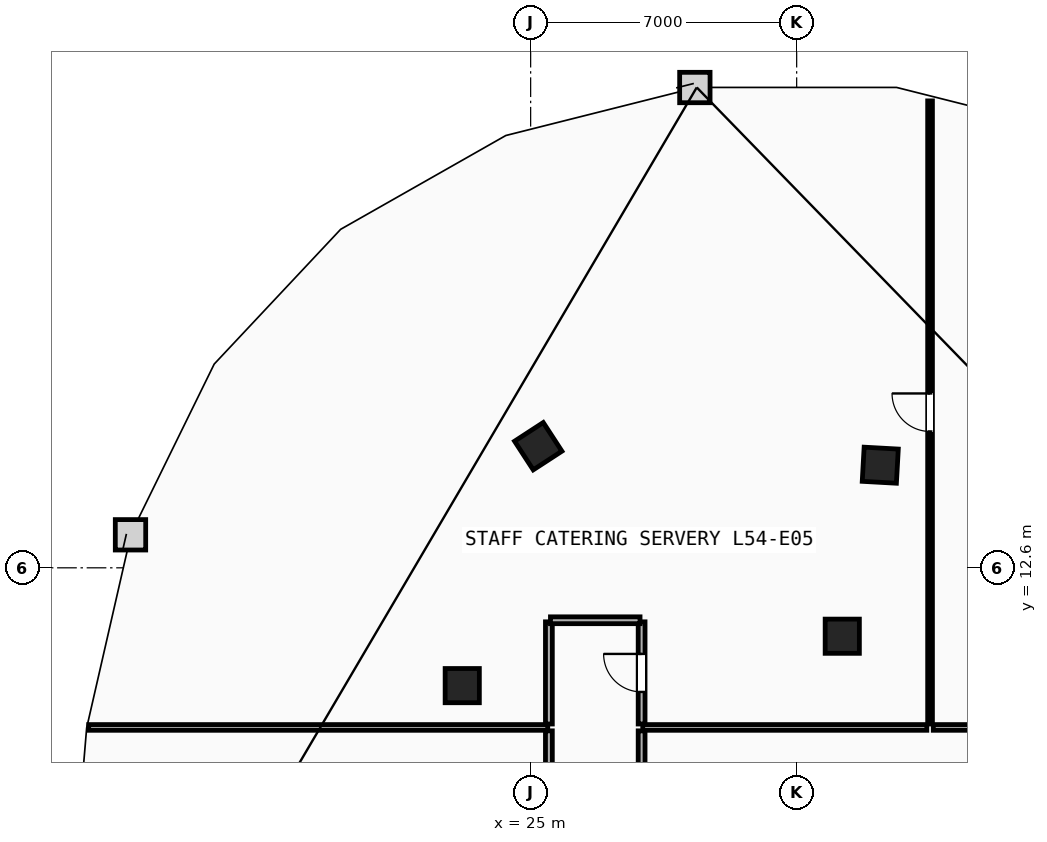
"""IFC4 building model, lengths in metres.
Left out: names, types, materials, properties, quantities, classifications, styles, units other than length and angle.
Written with IfcOpenShell. Run it as: python <this file> out.ifc"""

import sys

from ifc_helpers import new_model, si_unit, direction, frame, frame_2d, origin, origin_2d, place, context, subcontext, project, spatial, rectangle, extrude, element, fill, save


model = new_model("IFC4")
c1 = context("Model", 3, precision=1e-05, world=origin(), true_north=direction((0.0, 1.0)))
c2 = subcontext(c1, "Body", "Model", "MODEL_VIEW")
j1 = project(units=[si_unit("LENGTHUNIT", "METRE"), si_unit("PLANEANGLEUNIT", "RADIAN")], contexts=[c1])
p1 = place(None, origin())
s1 = spatial("IfcSite", under=j1, at=p1, CompositionType="ELEMENT")
p2 = place(p1, origin())
s2 = spatial("IfcBuilding", under=s1, at=p2, CompositionType="ELEMENT")
p3 = place(p2, frame((0.0, 0.0, 206.2)))
s3 = spatial("IfcBuildingStorey", under=s2, at=p3, CompositionType="ELEMENT", Elevation=206.2)
for number, where, z_axis, x_axis in (
    (1, (33.2, 10.8, 0.0), (0.0, 0.0, 1.0), (1.0, 0.0, 0.0)),
    (2, (23.2, 9.5, 0.0), (0.0, 0.0, 1.0), (1.0, 0.0, 0.0)),
    (3, (34.2, 15.3, 0.0), (0.0, 0.0, 1.0), (-0.998, 0.055, 0.0)),
    (4, (25.2, 15.8, 0.0), (0.0, 0.0, 1.0), (-0.838, -0.546, 0.0)),
):
    element("IfcColumn", number, at=place(p3, frame(where, z_axis=z_axis, x_axis=x_axis)), inside=s3, PredefinedType="COLUMN", context=c2, shape_type="SweptSolid", body=[
        extrude(rectangle(XDim=0.9, YDim=0.9, at=origin_2d()), origin(), (0.0, 0.0, 1.0), 3.6),
    ])
p4 = place(p3, frame((13.37, 8.4, 0.0), z_axis=(0.0, 0.0, 1.0), x_axis=(1.0, 0.0, 0.0)))
e5 = element("IfcWall", 5, at=p4, inside=s3, PredefinedType="PARTITIONING", context=c2, shape_type="SweptSolid", body=[
    extrude(rectangle(XDim=12.08, YDim=0.15, at=frame_2d((6.04, 0.0))), origin(), (0.0, 0.0, 1.0), 3.34),
])
p5 = place(p3, frame((27.95, 8.4, 0.0), z_axis=(0.0, 0.0, 1.0), x_axis=(1.0, 0.0, 0.0)))
e6 = element("IfcWall", 6, at=p5, inside=s3, PredefinedType="PARTITIONING", context=c2, shape_type="SweptSolid", body=[
    extrude(rectangle(XDim=7.475, YDim=0.15, at=frame_2d((3.738, 0.0))), origin(), (0.0, 0.0, 1.0), 3.34),
])
p6 = place(p3, frame((35.595, 8.4, 0.0), z_axis=(0.0, 0.0, 1.0), x_axis=(1.0, 0.0, 0.0)))
e7 = element("IfcWall", 7, at=p6, inside=s3, PredefinedType="PARTITIONING", context=c2, shape_type="SweptSolid", body=[
    extrude(rectangle(XDim=15.035, YDim=0.15, at=frame_2d((7.517, 0.0))), origin(), (0.0, 0.0, 1.0), 3.34),
])
p7 = place(p3, frame((25.48, 8.31, 0.0), z_axis=(0.0, 0.0, 1.0), x_axis=(0.0, -1.0, 0.0)))
e8 = element("IfcWall", 8, at=p7, inside=s3, PredefinedType="PARTITIONING", context=c2, shape_type="SweptSolid", body=[
    extrude(rectangle(XDim=7.86, YDim=0.18, at=frame_2d((3.93, 0.0))), origin(), (0.0, 0.0, 1.0), 3.34),
])
p8 = place(p3, frame((27.92, 0.45, 0.0), z_axis=(0.0, 0.0, 1.0), x_axis=(0.0, 1.0, 0.0)))
e9 = element("IfcWall", 9, at=p8, inside=s3, PredefinedType="PARTITIONING", context=c2, shape_type="SweptSolid", body=[
    extrude(rectangle(XDim=7.86, YDim=0.18, at=frame_2d((3.93, 0.0))), origin(), (0.0, 0.0, 1.0), 3.34),
])
p9 = place(p8, frame((3.43, 0.0, 0.0)))
e10 = element("IfcOpeningElement", 10, at=p9, cuts=e9, PredefinedType="OPENING", context=c2, shape_type="SweptSolid", body=[
    extrude(rectangle(XDim=1.0, YDim=2.15, at=frame_2d((0.5, 1.075))), frame((0.0, 0.1, 0.0), z_axis=(0.0, -1.0, 0.0), x_axis=(1.0, 0.0, 0.0)), (0.0, 0.0, 1.0), 0.2),
])
p10 = place(p3, frame((27.92, 8.49, 0.0), z_axis=(0.0, 0.0, 1.0), x_axis=(0.0, 1.0, 0.0)))
e11 = element("IfcWall", 11, at=p10, inside=s3, PredefinedType="PARTITIONING", context=c2, shape_type="SweptSolid", body=[
    extrude(rectangle(XDim=2.688, YDim=0.18, at=frame_2d((1.344, 0.0))), origin(), (0.0, 0.0, 1.0), 3.34),
])
p11 = place(p10, frame((0.844, 0.0, 0.0)))
e12 = element("IfcOpeningElement", 12, at=p11, cuts=e11, PredefinedType="OPENING", context=c2, shape_type="SweptSolid", body=[
    extrude(rectangle(XDim=1.0, YDim=2.15, at=frame_2d((0.5, 1.075))), frame((0.0, 0.1, 0.0), z_axis=(0.0, -1.0, 0.0), x_axis=(1.0, 0.0, 0.0)), (0.0, 0.0, 1.0), 0.2),
])
p12 = place(p3, frame((25.48, 11.178, 0.0), z_axis=(0.0, 0.0, 1.0), x_axis=(0.0, -1.0, 0.0)))
e13 = element("IfcWall", 13, at=p12, inside=s3, PredefinedType="PARTITIONING", context=c2, shape_type="SweptSolid", body=[
    extrude(rectangle(XDim=2.688, YDim=0.18, at=frame_2d((1.344, 0.0))), origin(), (0.0, 0.0, 1.0), 3.34),
])
p13 = place(p3, frame((27.878, 11.22, 0.0), z_axis=(0.0, 0.0, 1.0), x_axis=(-1.0, 0.0, 0.0)))
e14 = element("IfcWall", 14, at=p13, inside=s3, PredefinedType="PARTITIONING", context=c2, shape_type="SweptSolid", body=[
    extrude(rectangle(XDim=2.357, YDim=0.18, at=frame_2d((1.178, 0.0))), origin(), (0.0, 0.0, 1.0), 3.34),
])
p14 = place(p3, frame((35.51, 8.49, 0.0), z_axis=(0.0, 0.0, 1.0), x_axis=(0.0, 1.0, 0.0)))
e15 = element("IfcWall", 15, at=p14, inside=s3, PredefinedType="PARTITIONING", context=c2, shape_type="SweptSolid", body=[
    extrude(rectangle(XDim=16.396, YDim=0.125, at=frame_2d((8.198, 0.0))), origin(), (0.0, 0.0, 1.0), 3.34),
])
p15 = place(p14, frame((7.698, 0.0, 0.0)))
e16 = element("IfcOpeningElement", 16, at=p15, cuts=e15, PredefinedType="OPENING", context=c2, shape_type="SweptSolid", body=[
    extrude(rectangle(XDim=1.0, YDim=2.15, at=frame_2d((0.5, 1.075))), frame((0.0, 0.073, 0.0), z_axis=(0.0, -1.0, 0.0), x_axis=(1.0, 0.0, 0.0)), (0.0, 0.0, 1.0), 0.145),
])
p16 = place(p15, origin())
e17 = element("IfcDoor", 17, at=p16, inside=s3, OperationType="SINGLE_SWING_RIGHT", PredefinedType="DOOR", context=c2, shape_type="SweptSolid", body=[
    extrude(rectangle(XDim=1.0, YDim=2.15, at=frame_2d((0.5, 1.075))), frame((0.0, 0.025, 0.0), z_axis=(0.0, -1.0, 0.0), x_axis=(1.0, 0.0, 0.0)), (0.0, 0.0, 1.0), 0.05),
])
fill(e16, e17)
p17 = place(p11, origin())
e18 = element("IfcDoor", 18, at=p17, inside=s3, OperationType="SINGLE_SWING_RIGHT", PredefinedType="DOOR", context=c2, shape_type="SweptSolid", body=[
    extrude(rectangle(XDim=1.0, YDim=2.15, at=frame_2d((0.5, 1.075))), frame((0.0, 0.025, 0.0), z_axis=(0.0, -1.0, 0.0), x_axis=(1.0, 0.0, 0.0)), (0.0, 0.0, 1.0), 0.05),
])
fill(e12, e18)
save(model, sys.argv[1])
